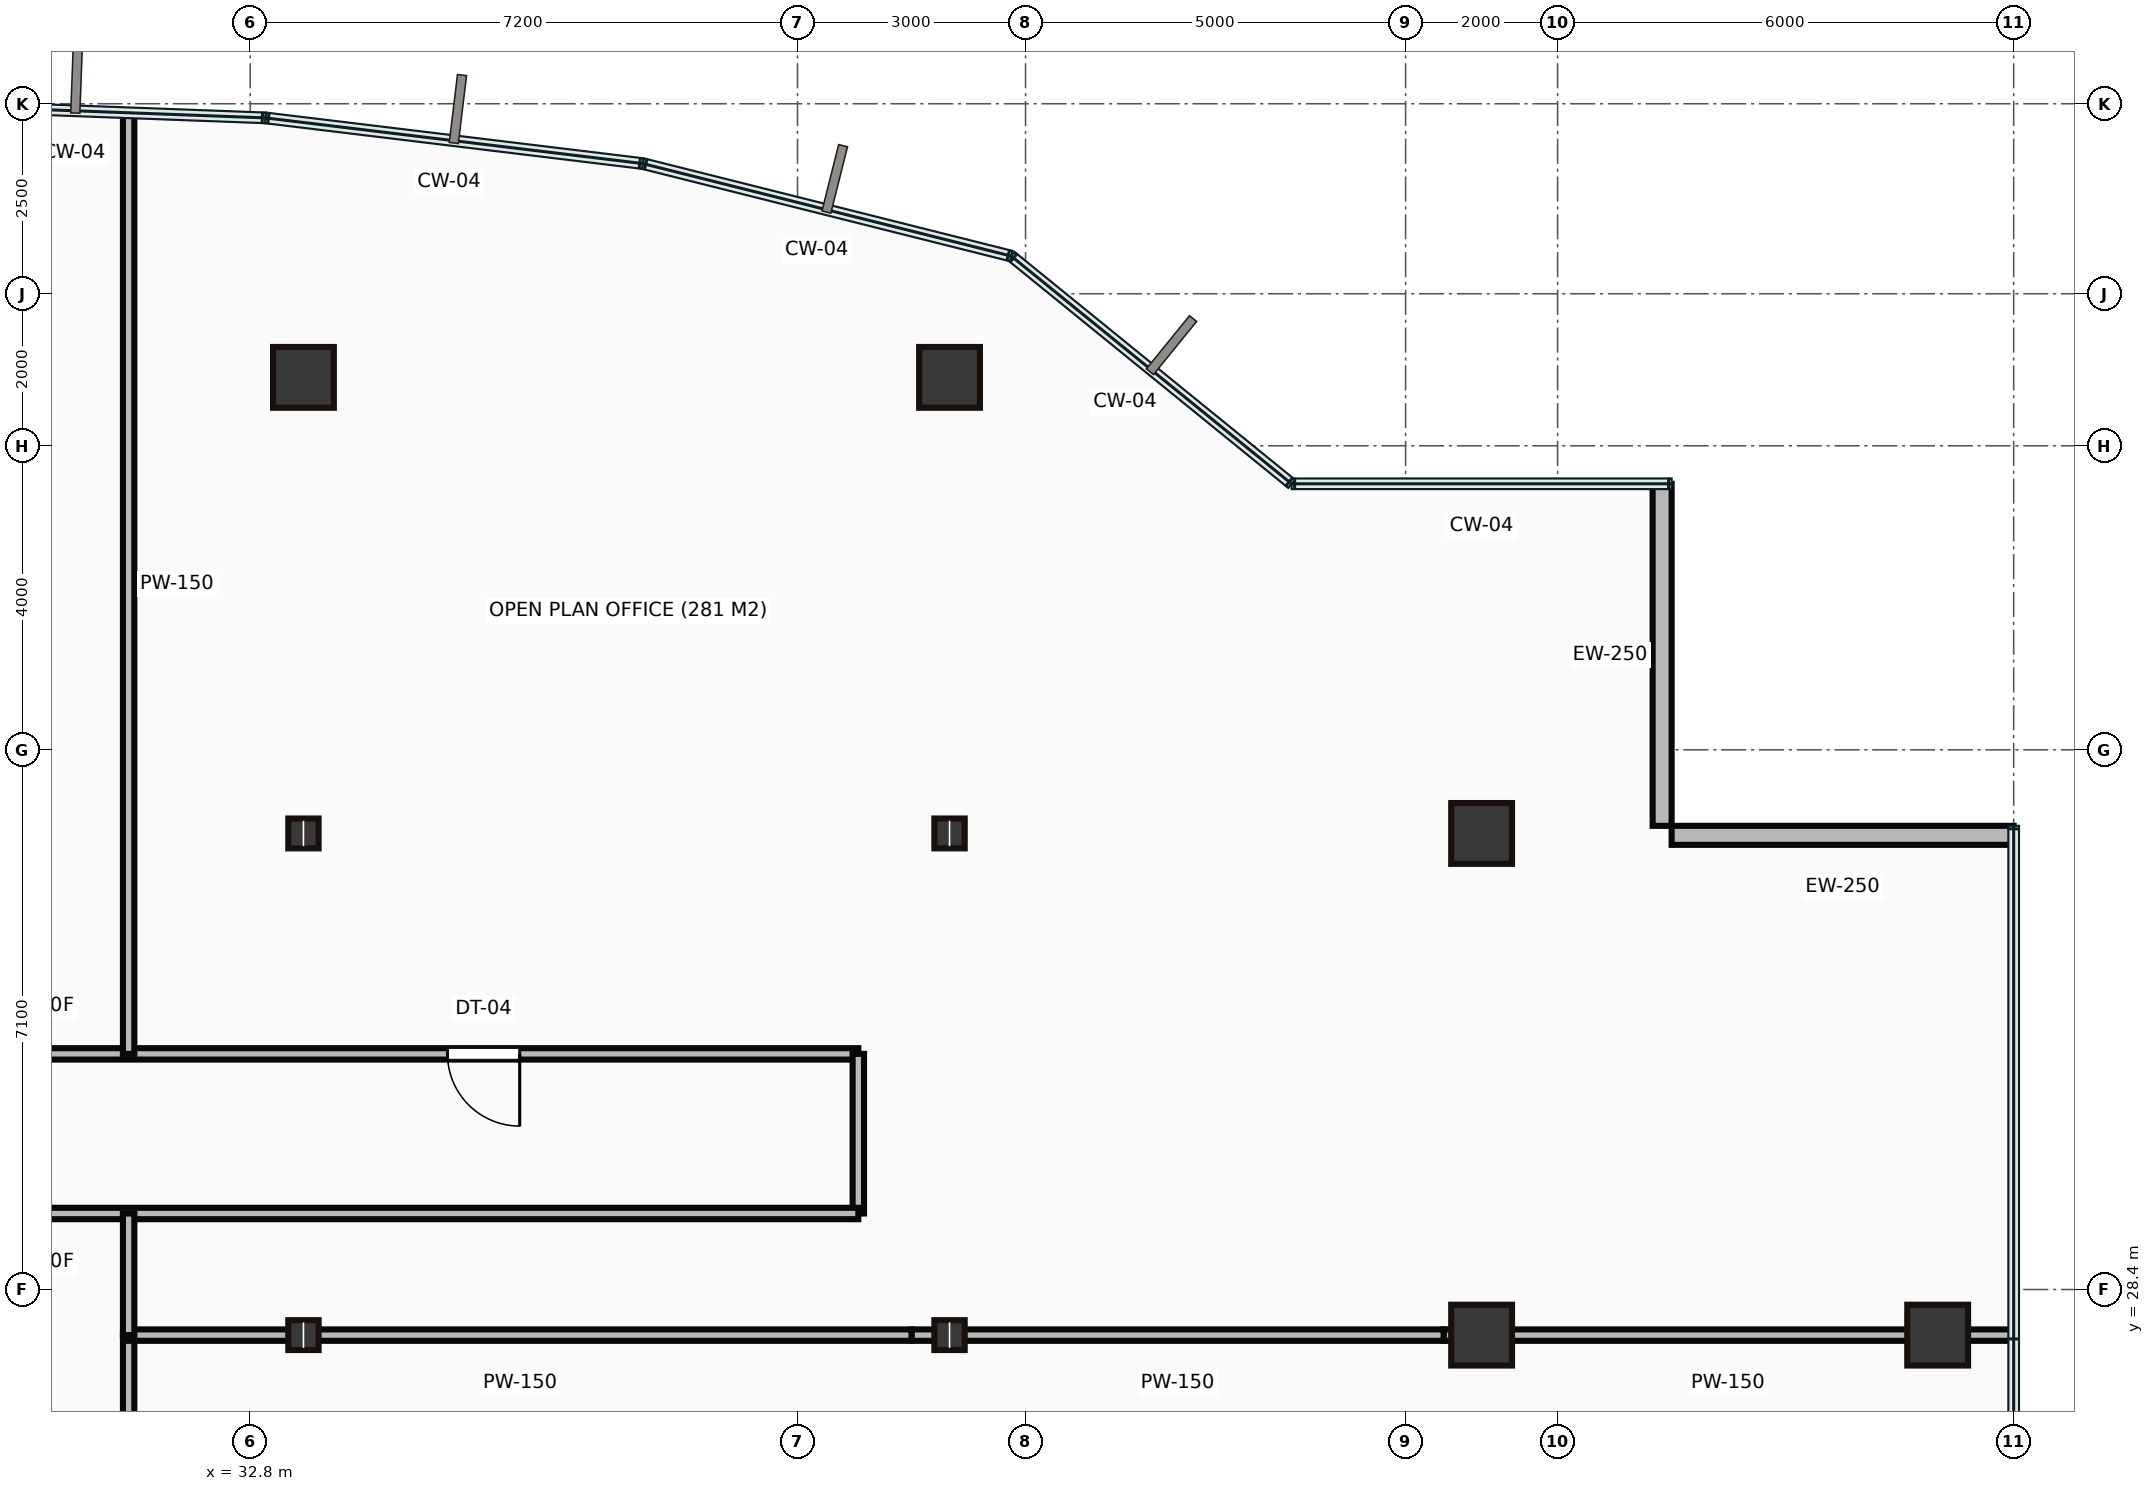
"""IFC4 building model, lengths in metres.
Left out: names, types, materials, properties, quantities, classifications, styles, units other than length and angle.
Written with IfcOpenShell. Run it as: python <this file> out.ifc"""

import sys

from ifc_helpers import new_model, si_unit, direction, frame, frame_2d, origin, origin_2d, place, context, subcontext, project, spatial, rectangle, hollow_rectangle, i_section, extrude, source, transform, mapped, element, fill, save


model = new_model("IFC4")
c1 = context("Model", 3, precision=1e-05, world=origin(), true_north=direction((0.0, 1.0)))
c2 = subcontext(c1, "Body", "Model", "MODEL_VIEW")
j1 = project(units=[si_unit("LENGTHUNIT", "METRE"), si_unit("PLANEANGLEUNIT", "RADIAN")], contexts=[c1])
p1 = place(None, origin())
s1 = spatial("IfcSite", under=j1, at=p1, CompositionType="ELEMENT")
p2 = place(p1, origin())
s2 = spatial("IfcBuilding", under=s1, at=p2, CompositionType="ELEMENT")
p3 = place(p2, frame((0.0, 0.0, 128.8)))
s3 = spatial("IfcBuildingStorey", under=s2, at=p3, CompositionType="ELEMENT", Elevation=128.8)
m1 = source(origin(), c2, "Body", "SweptSolid", [
    extrude(i_section(OverallWidth=0.399, OverallDepth=0.393, WebThickness=0.023, FlangeThickness=0.037, at=origin_2d()), origin(), (0.0, 0.0, 1.0), 3.65),
])
for number, where, z_axis, x_axis in (
    (1, (33.5, 27.8, 0.0), (0.0, 0.0, 1.0), (1.0, 0.0, 0.0)),
    (2, (33.5, 34.4, 0.0), (0.0, 0.0, 1.0), (1.0, 0.0, 0.0)),
):
    element("IfcColumn", number, at=place(p3, frame(where, z_axis=z_axis, x_axis=x_axis)), inside=s3, PredefinedType="COLUMN", context=c2, shape_type="MappedRepresentation", body=[
        mapped(m1, transform((0.0, 0.0, 0.0))),
    ])
m2 = source(origin(), c2, "Body", "SweptSolid", [
    extrude(hollow_rectangle(XDim=0.8, YDim=0.8, WallThickness=0.04, at=origin_2d()), origin(), (0.0, 0.0, 1.0), 3.65),
])
p4 = place(p3, frame((33.5, 40.4, 0.0), z_axis=(0.0, 0.0, 1.0), x_axis=(1.0, 0.0, 0.0)))
e3 = element("IfcColumn", 3, at=p4, inside=s3, PredefinedType="COLUMN", context=c2, shape_type="MappedRepresentation", body=[
    mapped(m2, transform((0.0, 0.0, 0.0))),
])
for number, where, z_axis, x_axis in (
    (4, (42.0, 27.8, 0.0), (0.0, 0.0, 1.0), (1.0, 0.0, 0.0)),
    (5, (42.0, 34.4, 0.0), (0.0, 0.0, 1.0), (1.0, 0.0, 0.0)),
):
    element("IfcColumn", number, at=place(p3, frame(where, z_axis=z_axis, x_axis=x_axis)), inside=s3, PredefinedType="COLUMN", context=c2, shape_type="MappedRepresentation", body=[
        mapped(m1, transform((0.0, 0.0, 0.0))),
    ])
for number, where, z_axis, x_axis in (
    (6, (42.0, 40.4, 0.0), (0.0, 0.0, 1.0), (1.0, 0.0, 0.0)),
    (7, (49.0, 27.8, 0.0), (0.0, 0.0, 1.0), (1.0, 0.0, 0.0)),
    (8, (49.0, 34.4, 0.0), (0.0, 0.0, 1.0), (1.0, 0.0, 0.0)),
    (9, (55.0, 27.8, 0.0), (0.0, 0.0, 1.0), (1.0, 0.0, 0.0)),
):
    element("IfcColumn", number, at=place(p3, frame(where, z_axis=z_axis, x_axis=x_axis)), inside=s3, PredefinedType="COLUMN", context=c2, shape_type="MappedRepresentation", body=[
        mapped(m2, transform((0.0, 0.0, 0.0))),
    ])
m3 = source(origin(), c2, "Body", "SweptSolid", [
    extrude(rectangle(XDim=4.5, YDim=0.25, at=frame_2d((2.25, 0.0))), origin(), (0.0, 0.0, 1.0), 3.4),
])
for number, where, z_axis, x_axis in (
    (10, (56.0, 34.375, 0.0), (0.0, 0.0, 1.0), (-1.0, 0.0, 0.0)),
    (11, (51.375, 34.5, 0.0), (0.0, 0.0, 1.0), (0.0, 1.0, 0.0)),
):
    element("IfcWall", number, at=place(p3, frame(where, z_axis=z_axis, x_axis=x_axis)), inside=s3, PredefinedType="STANDARD", context=c2, shape_type="MappedRepresentation", body=[
        mapped(m3, transform((0.0, 0.0, 0.0))),
    ])
m4 = source(origin(), c2, "Body", "SweptSolid", [
    extrude(rectangle(XDim=21.75, YDim=0.15, at=frame_2d((10.875, 0.0))), origin(), (0.0, 0.0, 1.0), 3.4),
])
p5 = place(p3, frame((19.05, 31.5, 0.0), z_axis=(0.0, 0.0, 1.0), x_axis=(1.0, 0.0, 0.0)))
e12 = element("IfcWall", 12, at=p5, inside=s3, PredefinedType="PARTITIONING", context=c2, shape_type="MappedRepresentation", body=[
    mapped(m4, transform((0.0, 0.0, 0.0))),
])
p6 = place(p5, frame((1.03, 0.0, 0.0)))
e13 = element("IfcOpeningElement", 13, at=p6, cuts=e12, PredefinedType="OPENING", context=c2, shape_type="SweptSolid", body=[
    extrude(rectangle(XDim=0.95, YDim=2.15, at=frame_2d((0.475, 1.075))), frame((0.0, 0.085, 0.0), z_axis=(0.0, -1.0, 0.0), x_axis=(1.0, 0.0, 0.0)), (0.0, 0.0, 1.0), 0.17),
])
p7 = place(p5, frame((6.975, 0.0, 0.0)))
e14 = element("IfcOpeningElement", 14, at=p7, cuts=e12, PredefinedType="OPENING", context=c2, shape_type="SweptSolid", body=[
    extrude(rectangle(XDim=0.95, YDim=2.15, at=frame_2d((0.475, 1.075))), frame((0.0, 0.085, 0.0), z_axis=(0.0, -1.0, 0.0), x_axis=(1.0, 0.0, 0.0)), (0.0, 0.0, 1.0), 0.17),
])
p8 = place(p5, frame((16.345, 0.0, 0.0)))
e15 = element("IfcOpeningElement", 15, at=p8, cuts=e12, PredefinedType="OPENING", context=c2, shape_type="SweptSolid", body=[
    extrude(rectangle(XDim=0.95, YDim=2.15, at=frame_2d((0.475, 1.075))), frame((0.0, 0.085, 0.0), z_axis=(0.0, -1.0, 0.0), x_axis=(1.0, 0.0, 0.0)), (0.0, 0.0, 1.0), 0.17),
])
m5 = source(origin(), c2, "Body", "SweptSolid", [
    extrude(rectangle(XDim=2.1, YDim=0.15, at=frame_2d((1.05, 0.0))), origin(), (0.0, 0.0, 1.0), 3.4),
])
p9 = place(p3, frame((40.8, 31.5, 0.0), z_axis=(0.0, 0.0, 1.0), x_axis=(0.0, -1.0, 0.0)))
e16 = element("IfcWall", 16, at=p9, inside=s3, PredefinedType="PARTITIONING", context=c2, shape_type="MappedRepresentation", body=[
    mapped(m5, transform((0.0, 0.0, 0.0))),
])
p10 = place(p3, frame((40.8, 29.4, 0.0), z_axis=(0.0, 0.0, 1.0), x_axis=(-1.0, 0.0, 0.0)))
e17 = element("IfcWall", 17, at=p10, inside=s3, PredefinedType="PARTITIONING", context=c2, shape_type="MappedRepresentation", body=[
    mapped(m4, transform((0.0, 0.0, 0.0))),
])
m6 = source(origin(), c2, "Body", "SweptSolid", [
    extrude(rectangle(XDim=11.5, YDim=0.15, at=frame_2d((5.75, 0.0))), origin(), (0.0, 0.0, 1.0), 3.4),
])
p11 = place(p3, frame((31.2, 27.8, 0.0), z_axis=(0.0, 0.0, 1.0), x_axis=(0.0, -1.0, 0.0)))
e18 = element("IfcWall", 18, at=p11, inside=s3, PredefinedType="PARTITIONING", context=c2, shape_type="MappedRepresentation", body=[
    mapped(m6, transform((0.0, 0.0, 0.0))),
])
m7 = source(origin(), c2, "Body", "SweptSolid", [
    extrude(rectangle(XDim=7.48, YDim=0.15, at=frame_2d((3.74, 0.0))), origin(), (0.0, 0.0, 1.0), 2.702),
])
p12 = place(p3, frame((55.98, 27.8, 0.0), z_axis=(0.0, 0.0, 1.0), x_axis=(-1.0, 0.0, 0.0)))
e19 = element("IfcWall", 19, at=p12, inside=s3, PredefinedType="PARTITIONING", context=c2, shape_type="MappedRepresentation", body=[
    mapped(m7, transform((0.0, 0.0, 0.0))),
])
m8 = source(origin(), c2, "Body", "SweptSolid", [
    extrude(rectangle(XDim=7.0, YDim=0.15, at=frame_2d((3.5, 0.0))), origin(), (0.0, 0.0, 1.0), 2.702),
])
p13 = place(p3, frame((48.5, 27.8, 0.0), z_axis=(0.0, 0.0, 1.0), x_axis=(-1.0, 0.0, 0.0)))
e20 = element("IfcWall", 20, at=p13, inside=s3, PredefinedType="PARTITIONING", context=c2, shape_type="MappedRepresentation", body=[
    mapped(m8, transform((0.0, 0.0, 0.0))),
])
m9 = source(origin(), c2, "Body", "SweptSolid", [
    extrude(rectangle(XDim=10.3, YDim=0.15, at=frame_2d((5.15, 0.0))), origin(), (0.0, 0.0, 1.0), 2.702),
])
p14 = place(p3, frame((41.5, 27.8, 0.0), z_axis=(0.0, 0.0, 1.0), x_axis=(-1.0, 0.0, 0.0)))
e21 = element("IfcWall", 21, at=p14, inside=s3, PredefinedType="PARTITIONING", context=c2, shape_type="MappedRepresentation", body=[
    mapped(m9, transform((0.0, 0.0, 0.0))),
])
m10 = source(origin(), c2, "Body", "SweptSolid", [
    extrude(rectangle(XDim=1.6, YDim=0.15, at=frame_2d((0.8, 0.0))), origin(), (0.0, 0.0, 1.0), 3.4),
])
p15 = place(p3, frame((31.2, 29.4, 0.0), z_axis=(0.0, 0.0, 1.0), x_axis=(0.0, -1.0, 0.0)))
e22 = element("IfcWall", 22, at=p15, inside=s3, PredefinedType="PARTITIONING", context=c2, shape_type="MappedRepresentation", body=[
    mapped(m10, transform((0.0, 0.0, 0.0))),
])
m11 = source(origin(), c2, "Body", "SweptSolid", [
    extrude(rectangle(XDim=12.361, YDim=0.15, at=frame_2d((6.18, 0.0))), origin(), (0.0, 0.0, 1.0), 3.4),
])
p16 = place(p3, frame((31.2, 43.861, 0.0), z_axis=(0.0, 0.0, 1.0), x_axis=(0.0, -1.0, 0.0)))
e23 = element("IfcWall", 23, at=p16, inside=s3, PredefinedType="PARTITIONING", context=c2, shape_type="MappedRepresentation", body=[
    mapped(m11, transform((0.0, 0.0, 0.0))),
])
m12 = source(origin(), c2, "Body", "SweptSolid", [
    extrude(rectangle(XDim=0.95, YDim=2.15, at=frame_2d((0.475, 1.075))), frame((0.0, 0.025, 0.0), z_axis=(0.0, -1.0, 0.0), x_axis=(1.0, 0.0, 0.0)), (0.0, 0.0, 1.0), 0.05),
])
p17 = place(p8, origin())
e24 = element("IfcDoor", 24, at=p17, inside=s3, OperationType="SINGLE_SWING_RIGHT", PredefinedType="DOOR", context=c2, shape_type="MappedRepresentation", body=[
    mapped(m12, transform((0.0, 0.0, 0.0))),
])
fill(e15, e24)
save(model, sys.argv[1])
